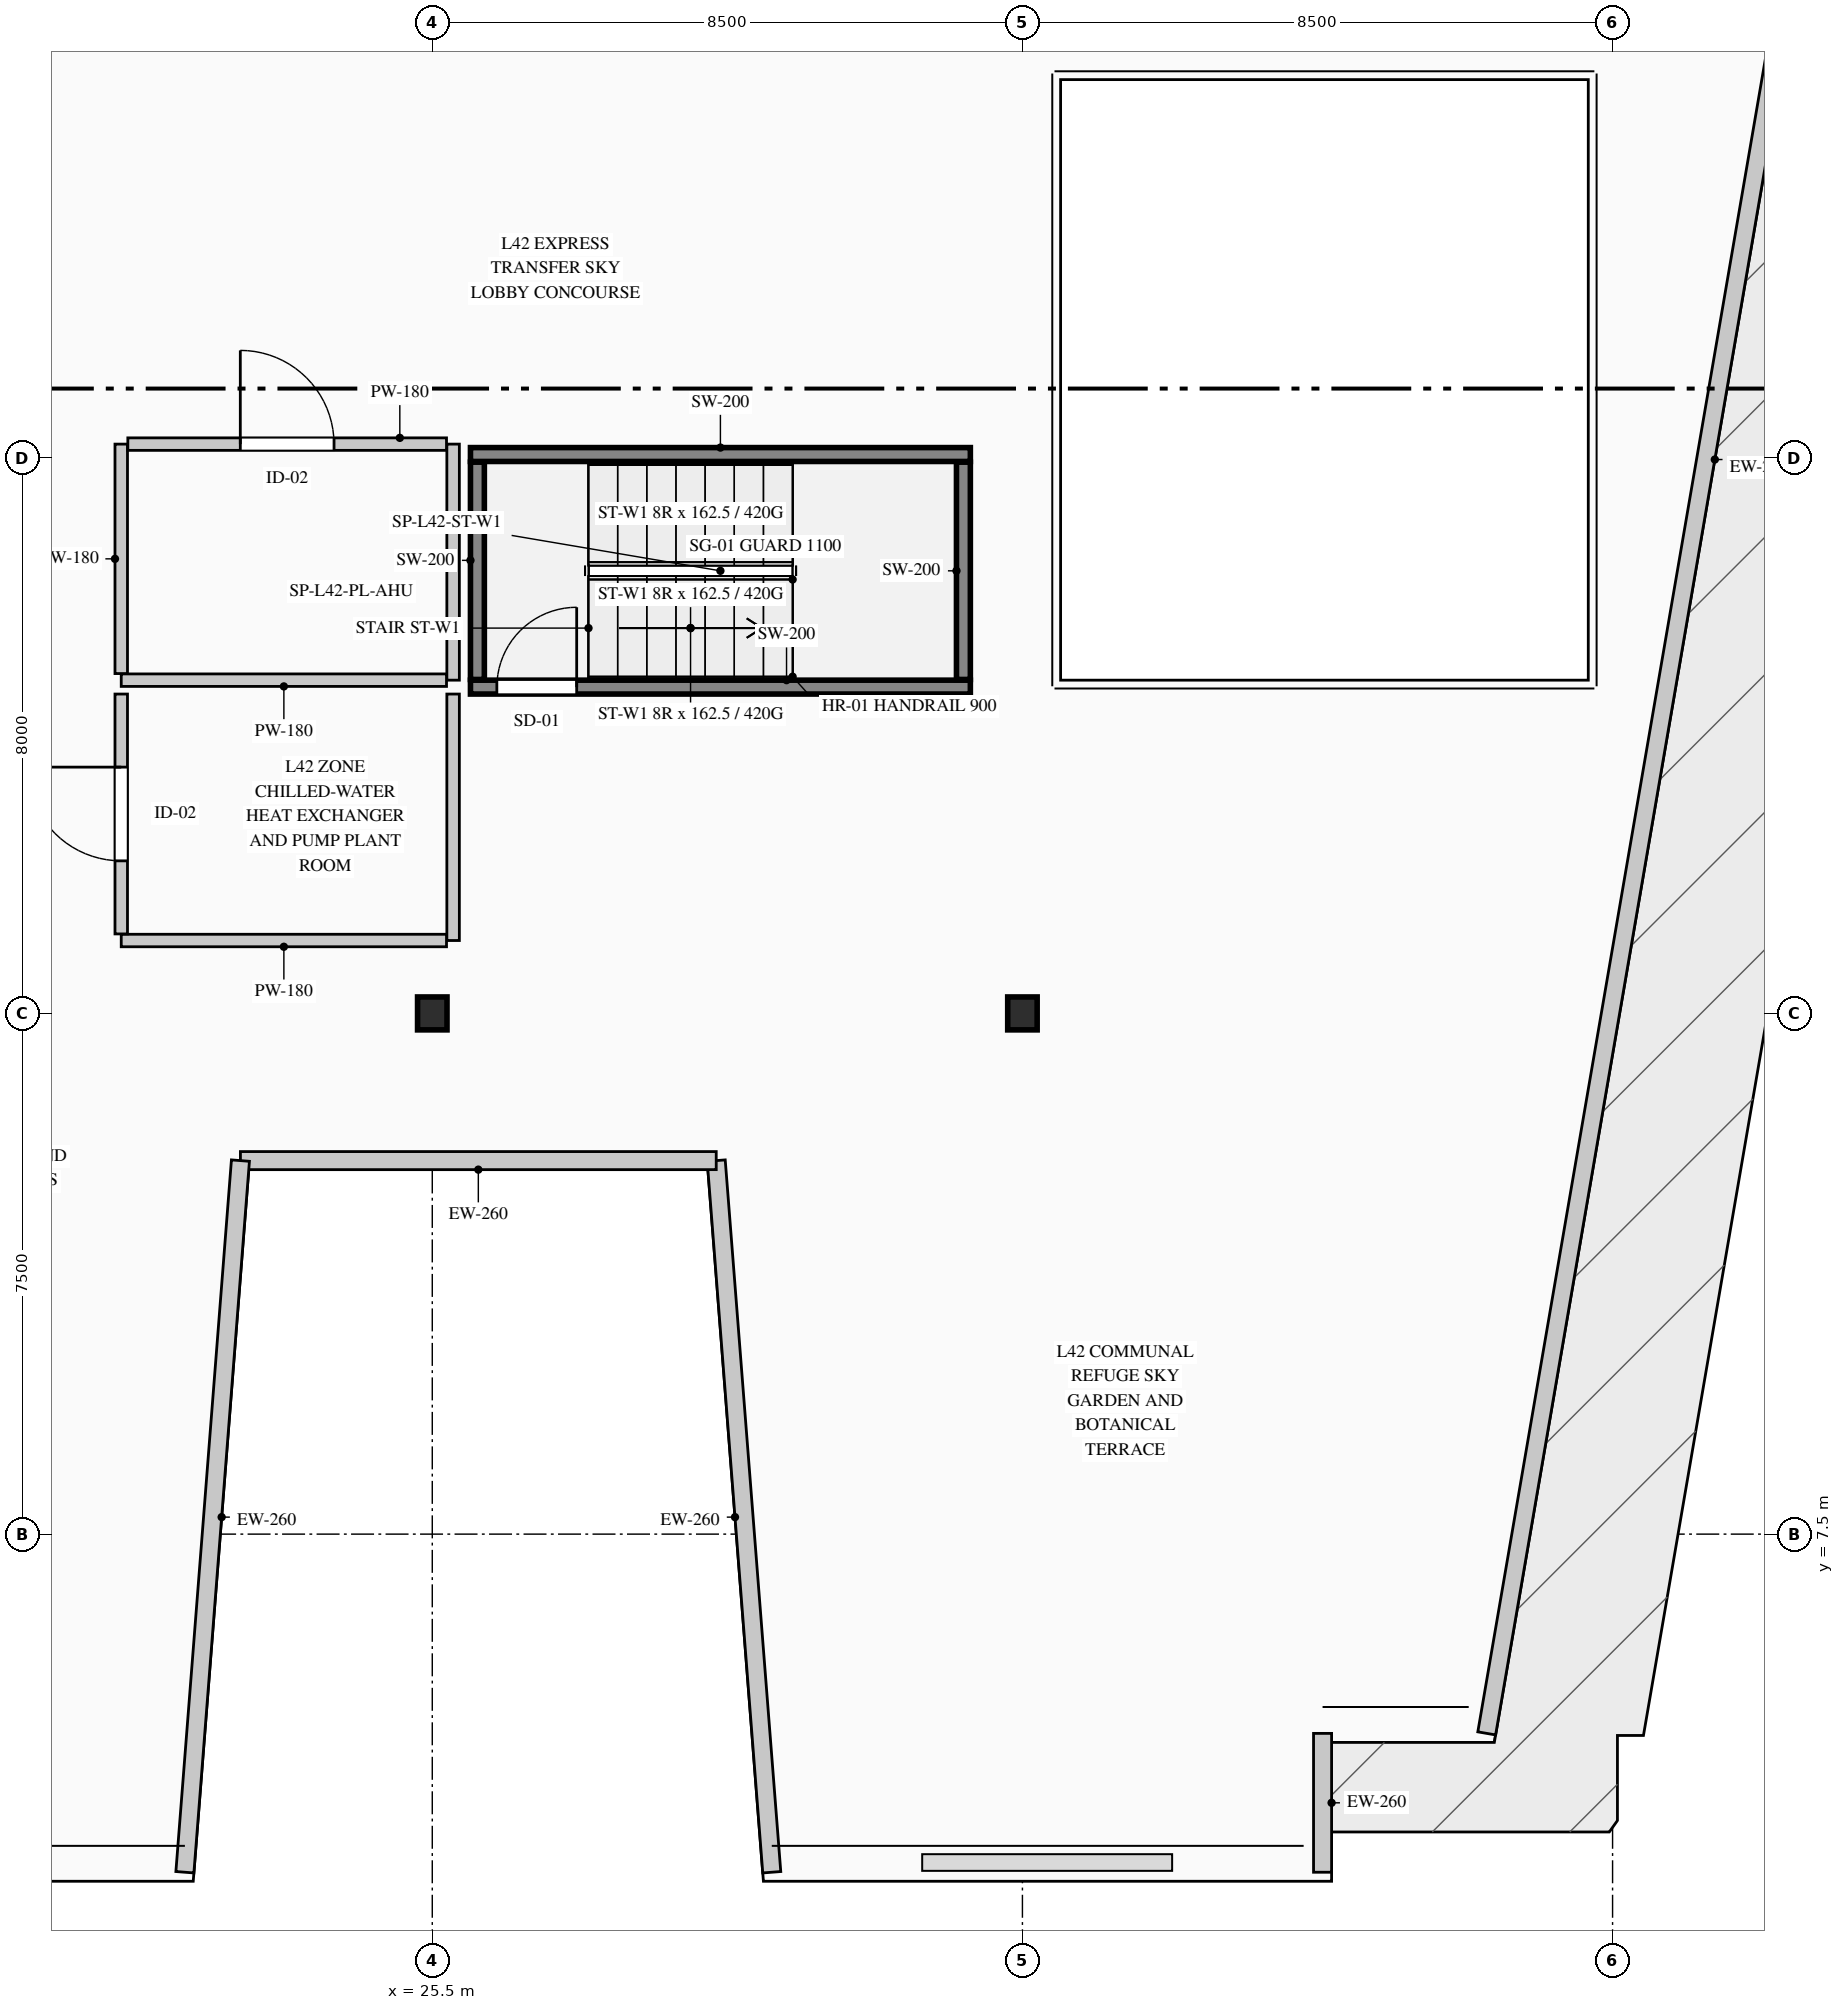
"""IFC4 building model, lengths in metres.
Left out: names, types, materials, properties, quantities, classifications, styles, units other than length and angle.
Written with IfcOpenShell. Run it as: python <this file> out.ifc"""

import sys

from ifc_helpers import new_model, si_unit, direction, frame, frame_2d, origin, origin_2d, place, context, subcontext, project, spatial, rectangle, i_section, extrude, element, fill, save


model = new_model("IFC4")
c1 = context("Model", 3, precision=1e-05, world=origin(), true_north=direction((0.0, 1.0)))
c2 = subcontext(c1, "Body", "Model", "MODEL_VIEW")
j1 = project(units=[si_unit("LENGTHUNIT", "METRE"), si_unit("PLANEANGLEUNIT", "RADIAN")], contexts=[c1])
p1 = place(None, origin())
s1 = spatial("IfcSite", under=j1, at=p1, CompositionType="ELEMENT")
p2 = place(p1, origin())
s2 = spatial("IfcBuilding", under=s1, at=p2, CompositionType="ELEMENT")
p3 = place(p2, frame((0.0, 0.0, 178.55)))
s3 = spatial("IfcBuildingStorey", under=s2, at=p3, CompositionType="ELEMENT", Elevation=178.55)
p4 = place(p3, frame((26.05, 19.7, 0.0), z_axis=(0.0, 0.0, 1.0), x_axis=(1.0, 0.0, 0.0)))
e1 = element("IfcWall", 1, at=p4, inside=s3, PredefinedType="SHEAR", context=c2, shape_type="SweptSolid", body=[
    extrude(rectangle(XDim=7.2, YDim=0.2, at=frame_2d((3.6, 0.0))), origin(), (0.0, 0.0, 1.0), 5.2),
])
p5 = place(p4, frame((0.38, 0.0, 0.0)))
e2 = element("IfcOpeningElement", 2, at=p5, cuts=e1, PredefinedType="OPENING", context=c2, shape_type="SweptSolid", body=[
    extrude(rectangle(XDim=1.15, YDim=2.2, at=frame_2d((0.575, 1.1))), frame((0.0, 0.11, 0.0), z_axis=(0.0, -1.0, 0.0), x_axis=(1.0, 0.0, 0.0)), (0.0, 0.0, 1.0), 0.22),
])
p6 = place(p3, frame((26.05, 23.05, 0.0), z_axis=(0.0, 0.0, 1.0), x_axis=(1.0, 0.0, 0.0)))
e3 = element("IfcWall", 3, at=p6, inside=s3, PredefinedType="SHEAR", context=c2, shape_type="SweptSolid", body=[
    extrude(rectangle(XDim=7.2, YDim=0.2, at=frame_2d((3.6, 0.0))), origin(), (0.0, 0.0, 1.0), 5.2),
])
for number, where, z_axis, x_axis in (
    (4, (26.15, 19.81, 0.0), (0.0, 0.0, 1.0), (0.0, 1.0, 0.0)),
    (5, (33.15, 19.81, 0.0), (0.0, 0.0, 1.0), (0.0, 1.0, 0.0)),
):
    element("IfcWall", number, at=place(p3, frame(where, z_axis=z_axis, x_axis=x_axis)), inside=s3, PredefinedType="SHEAR", context=c2, shape_type="SweptSolid", body=[
        extrude(rectangle(XDim=3.13, YDim=0.2, at=frame_2d((1.565, 0.0))), origin(), (0.0, 0.0, 1.0), 5.2),
    ])
for number, where, z_axis, x_axis in (
    (6, (25.5, 15.0, 0.0), (0.0, 0.0, 1.0), (1.0, 0.0, 0.0)),
    (7, (34.0, 15.0, 0.0), (0.0, 0.0, 1.0), (1.0, 0.0, 0.0)),
):
    element("IfcColumn", number, at=place(p3, frame(where, z_axis=z_axis, x_axis=x_axis)), inside=s3, PredefinedType="COLUMN", context=c2, shape_type="SweptSolid", body=[
        extrude(i_section(OverallWidth=0.424, OverallDepth=0.474, WebThickness=0.048, FlangeThickness=0.077, FilletRadius=0.015, at=origin_2d()), origin(), (0.0, 0.0, 1.0), 5.2),
    ])
p7 = place(p3, frame((47.002, 41.37, 0.0), z_axis=(0.0, 0.0, 1.0), x_axis=(-0.169390420461, -0.985549027424, 0.0)))
e8 = element("IfcWall", 8, at=p7, inside=s3, PredefinedType="STANDARD", context=c2, shape_type="SweptSolid", body=[
    extrude(rectangle(XDim=37.279, YDim=0.26, at=frame_2d((18.64, 0.0))), origin(), (0.0, 0.0, 1.0), 4.95),
])
p8 = place(p3, frame((38.323, 4.63, 0.0), z_axis=(0.0, 0.0, 1.0), x_axis=(0.0, -1.0, 0.0)))
e9 = element("IfcWall", 9, at=p8, inside=s3, PredefinedType="STANDARD", context=c2, shape_type="SweptSolid", body=[
    extrude(rectangle(XDim=2.0, YDim=0.26, at=frame_2d((1.0, 0.0))), origin(), (0.0, 0.0, 1.0), 4.95),
])
p9 = place(p3, frame((30.39, 2.63, 0.0), z_axis=(0.0, 0.0, 1.0), x_axis=(-0.077816860153, 0.996967670627, 0.0)))
e10 = element("IfcWall", 10, at=p9, inside=s3, PredefinedType="STANDARD", context=c2, shape_type="SweptSolid", body=[
    extrude(rectangle(XDim=10.281, YDim=0.26, at=frame_2d((5.141, 0.0))), origin(), (0.0, 0.0, 1.0), 4.95),
])
p10 = place(p3, frame((29.59, 12.88, 0.0), z_axis=(0.0, 0.0, 1.0), x_axis=(-1.0, 0.0, 0.0)))
e11 = element("IfcWall", 11, at=p10, inside=s3, PredefinedType="STANDARD", context=c2, shape_type="SweptSolid", body=[
    extrude(rectangle(XDim=6.853, YDim=0.26, at=frame_2d((3.426, 0.0))), origin(), (0.0, 0.0, 1.0), 4.95),
])
p11 = place(p3, frame((22.737, 12.88, 0.0), z_axis=(0.0, 0.0, 1.0), x_axis=(-0.077816860153, -0.996967670627, 0.0)))
e12 = element("IfcWall", 12, at=p11, inside=s3, PredefinedType="STANDARD", context=c2, shape_type="SweptSolid", body=[
    extrude(rectangle(XDim=10.281, YDim=0.26, at=frame_2d((5.141, 0.0))), origin(), (0.0, 0.0, 1.0), 4.95),
])
p12 = place(p3, frame((25.8, 23.2, 0.0), z_axis=(0.0, 0.0, 1.0), x_axis=(0.0, -1.0, 0.0)))
e13 = element("IfcWall", 13, at=p12, inside=s3, PredefinedType="PARTITIONING", context=c2, shape_type="SweptSolid", body=[
    extrude(rectangle(XDim=3.4, YDim=0.18, at=frame_2d((1.7, 0.0))), origin(), (0.0, 0.0, 1.0), 4.95),
])
p13 = place(p3, frame((25.705, 19.8, 0.0), z_axis=(0.0, 0.0, 1.0), x_axis=(-1.0, 0.0, 0.0)))
e14 = element("IfcWall", 14, at=p13, inside=s3, PredefinedType="PARTITIONING", context=c2, shape_type="SweptSolid", body=[
    extrude(rectangle(XDim=4.685, YDim=0.18, at=frame_2d((2.343, 0.0))), origin(), (0.0, 0.0, 1.0), 4.95),
])
p14 = place(p3, frame((21.02, 19.895, 0.0), z_axis=(0.0, 0.0, 1.0), x_axis=(0.0, 1.0, 0.0)))
e15 = element("IfcWall", 15, at=p14, inside=s3, PredefinedType="PARTITIONING", context=c2, shape_type="SweptSolid", body=[
    extrude(rectangle(XDim=3.305, YDim=0.18, at=frame_2d((1.652, 0.0))), origin(), (0.0, 0.0, 1.0), 4.95),
])
p15 = place(p3, frame((21.115, 23.2, 0.0), z_axis=(0.0, 0.0, 1.0), x_axis=(1.0, 0.0, 0.0)))
e16 = element("IfcWall", 16, at=p15, inside=s3, PredefinedType="PARTITIONING", context=c2, shape_type="SweptSolid", body=[
    extrude(rectangle(XDim=4.59, YDim=0.18, at=frame_2d((2.295, 0.0))), origin(), (0.0, 0.0, 1.0), 4.95),
])
p16 = place(p15, frame((1.62, 0.0, 0.0)))
e17 = element("IfcOpeningElement", 17, at=p16, cuts=e16, PredefinedType="OPENING", context=c2, shape_type="SweptSolid", body=[
    extrude(rectangle(XDim=1.35, YDim=2.2, at=frame_2d((0.675, 1.1))), frame((0.0, 0.1, 0.0), z_axis=(0.0, -1.0, 0.0), x_axis=(1.0, 0.0, 0.0)), (0.0, 0.0, 1.0), 0.2),
])
p17 = place(p3, frame((25.8, 19.6, 0.0), z_axis=(0.0, 0.0, 1.0), x_axis=(0.0, -1.0, 0.0)))
e18 = element("IfcWall", 18, at=p17, inside=s3, PredefinedType="PARTITIONING", context=c2, shape_type="SweptSolid", body=[
    extrude(rectangle(XDim=3.55, YDim=0.18, at=frame_2d((1.775, 0.0))), origin(), (0.0, 0.0, 1.0), 4.95),
])
p18 = place(p3, frame((25.705, 16.05, 0.0), z_axis=(0.0, 0.0, 1.0), x_axis=(-1.0, 0.0, 0.0)))
e19 = element("IfcWall", 19, at=p18, inside=s3, PredefinedType="PARTITIONING", context=c2, shape_type="SweptSolid", body=[
    extrude(rectangle(XDim=4.685, YDim=0.18, at=frame_2d((2.343, 0.0))), origin(), (0.0, 0.0, 1.0), 4.575),
])
p19 = place(p3, frame((21.02, 16.145, 0.0), z_axis=(0.0, 0.0, 1.0), x_axis=(0.0, 1.0, 0.0)))
e20 = element("IfcWall", 20, at=p19, inside=s3, PredefinedType="PARTITIONING", context=c2, shape_type="SweptSolid", body=[
    extrude(rectangle(XDim=3.455, YDim=0.18, at=frame_2d((1.728, 0.0))), origin(), (0.0, 0.0, 1.0), 4.95),
])
p20 = place(p19, frame((1.052, 0.0, 0.0)))
e21 = element("IfcOpeningElement", 21, at=p20, cuts=e20, PredefinedType="OPENING", context=c2, shape_type="SweptSolid", body=[
    extrude(rectangle(XDim=1.35, YDim=2.2, at=frame_2d((0.675, 1.1))), frame((0.0, 0.1, 0.0), z_axis=(0.0, -1.0, 0.0), x_axis=(1.0, 0.0, 0.0)), (0.0, 0.0, 1.0), 0.2),
])
p21 = place(p5, origin())
e22 = element("IfcDoor", 22, at=p21, inside=s3, OperationType="SINGLE_SWING_RIGHT", PredefinedType="DOOR", context=c2, shape_type="SweptSolid", body=[
    extrude(rectangle(XDim=1.15, YDim=2.2, at=frame_2d((0.575, 1.1))), frame((0.0, 0.025, 0.0), z_axis=(0.0, -1.0, 0.0), x_axis=(1.0, 0.0, 0.0)), (0.0, 0.0, 1.0), 0.05),
])
fill(e2, e22)
p22 = place(p16, origin())
e23 = element("IfcDoor", 23, at=p22, inside=s3, OperationType="SINGLE_SWING_LEFT", PredefinedType="DOOR", context=c2, shape_type="SweptSolid", body=[
    extrude(rectangle(XDim=1.35, YDim=2.2, at=frame_2d((0.675, 1.1))), frame((0.0, 0.025, 0.0), z_axis=(0.0, -1.0, 0.0), x_axis=(1.0, 0.0, 0.0)), (0.0, 0.0, 1.0), 0.05),
])
fill(e17, e23)
p23 = place(p20, origin())
e24 = element("IfcDoor", 24, at=p23, inside=s3, OperationType="SINGLE_SWING_RIGHT", PredefinedType="DOOR", context=c2, shape_type="SweptSolid", body=[
    extrude(rectangle(XDim=1.35, YDim=2.2, at=frame_2d((0.675, 1.1))), frame((0.0, 0.025, 0.0), z_axis=(0.0, -1.0, 0.0), x_axis=(1.0, 0.0, 0.0)), (0.0, 0.0, 1.0), 0.05),
])
fill(e21, e24)
save(model, sys.argv[1])
